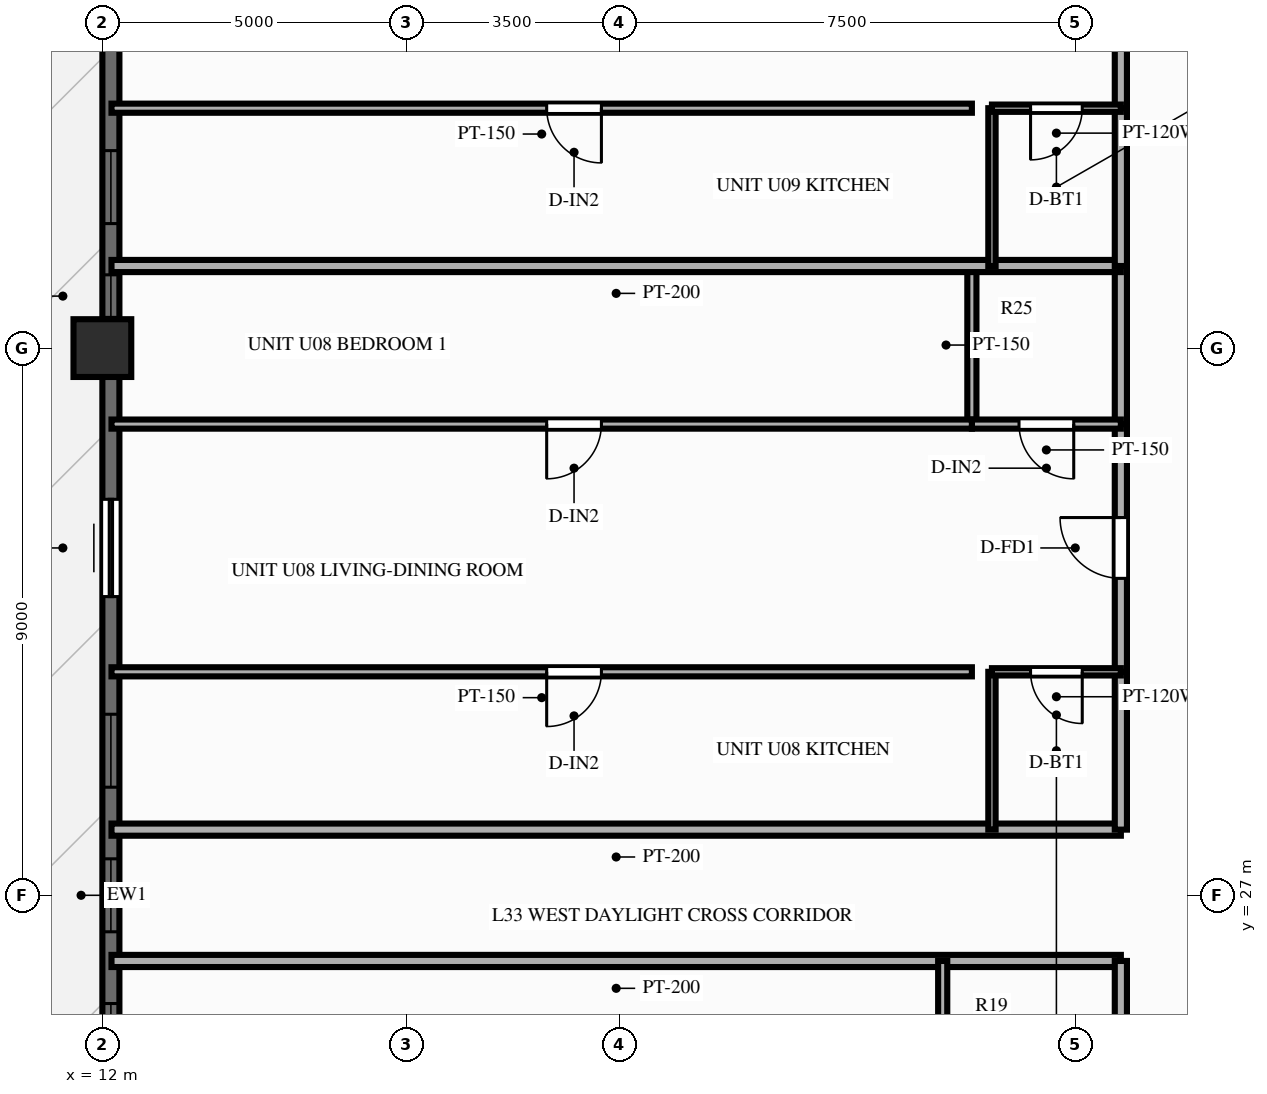
"""IFC4 building model, lengths in metres.
Left out: names, types, materials, properties, quantities, classifications, styles, units other than length and angle.
Written with IfcOpenShell. Run it as: python <this file> out.ifc"""

import sys

from ifc_helpers import new_model, si_unit, direction, frame, frame_2d, origin, origin_2d, place, context, subcontext, project, spatial, rectangle, extrude, source, transform, mapped, element, fill, save


model = new_model("IFC4")
c1 = context("Model", 3, precision=1e-05, world=origin(), true_north=direction((0.0, 1.0)))
c2 = subcontext(c1, "Body", "Model", "MODEL_VIEW")
j1 = project(units=[si_unit("LENGTHUNIT", "METRE"), si_unit("PLANEANGLEUNIT", "RADIAN")], contexts=[c1])
p1 = place(None, origin())
s1 = spatial("IfcSite", under=j1, at=p1, CompositionType="ELEMENT")
p2 = place(p1, origin())
s2 = spatial("IfcBuilding", under=s1, at=p2, CompositionType="ELEMENT")
p3 = place(p2, frame((0.0, 0.0, 104.85)))
s3 = spatial("IfcBuildingStorey", under=s2, at=p3, CompositionType="ELEMENT", Elevation=104.85)
m1 = source(origin(), c2, "Body", "SweptSolid", [
    extrude(rectangle(XDim=0.95, YDim=0.95, at=origin_2d()), origin(), (0.0, 0.0, 1.0), 3.0),
])
p4 = place(p3, frame((12.0, 36.0, 0.0), z_axis=(0.0, 0.0, 1.0), x_axis=(1.0, 0.0, 0.0)))
e1 = element("IfcColumn", 1, at=p4, inside=s3, PredefinedType="COLUMN", context=c2, shape_type="MappedRepresentation", body=[
    mapped(m1, transform((0.0, 0.0, 0.0), scale=1.0)),
])
p5 = place(p3, frame((12.14, 7.2, 0.0), z_axis=(0.0, 0.0, 1.0), x_axis=(0.0, 1.0, 0.0)))
e2 = element("IfcWall", 2, at=p5, inside=s3, PredefinedType="SOLIDWALL", context=c2, shape_type="SweptSolid", body=[
    extrude(rectangle(XDim=39.6, YDim=0.28, at=frame_2d((19.8, 0.0))), origin(), (0.0, 0.0, 1.0), 2.28),
])
p6 = place(p5, frame((0.945, 0.0, 0.25)))
e3 = element("IfcOpeningElement", 3, at=p6, cuts=e2, PredefinedType="OPENING", context=c2, shape_type="SweptSolid", body=[
    extrude(rectangle(XDim=1.2, YDim=1.5, at=frame_2d((0.6, 0.75))), frame((0.0, 0.152, 0.0), z_axis=(0.0, -1.0, 0.0), x_axis=(1.0, 0.0, 0.0)), (0.0, 0.0, 1.0), 0.304),
])
p7 = place(p5, frame((4.213, 0.0, 0.25)))
e4 = element("IfcOpeningElement", 4, at=p7, cuts=e2, PredefinedType="OPENING", context=c2, shape_type="SweptSolid", body=[
    extrude(rectangle(XDim=1.2, YDim=1.5, at=frame_2d((0.6, 0.75))), frame((0.0, 0.152, 0.0), z_axis=(0.0, -1.0, 0.0), x_axis=(1.0, 0.0, 0.0)), (0.0, 0.0, 1.0), 0.304),
])
p8 = place(p5, frame((7.55, 0.0, 0.25)))
e5 = element("IfcOpeningElement", 5, at=p8, cuts=e2, PredefinedType="OPENING", context=c2, shape_type="SweptSolid", body=[
    extrude(rectangle(XDim=1.2, YDim=1.5, at=frame_2d((0.6, 0.75))), frame((0.0, 0.152, 0.0), z_axis=(0.0, -1.0, 0.0), x_axis=(1.0, 0.0, 0.0)), (0.0, 0.0, 1.0), 0.304),
])
p9 = place(p5, frame((13.483, 0.0, 0.25)))
e6 = element("IfcOpeningElement", 6, at=p9, cuts=e2, PredefinedType="OPENING", context=c2, shape_type="SweptSolid", body=[
    extrude(rectangle(XDim=1.2, YDim=1.5, at=frame_2d((0.6, 0.75))), frame((0.0, 0.152, 0.0), z_axis=(0.0, -1.0, 0.0), x_axis=(1.0, 0.0, 0.0)), (0.0, 0.0, 1.0), 0.304),
])
p10 = place(p5, frame((16.82, 0.0, 0.25)))
e7 = element("IfcOpeningElement", 7, at=p10, cuts=e2, PredefinedType="OPENING", context=c2, shape_type="SweptSolid", body=[
    extrude(rectangle(XDim=1.2, YDim=1.5, at=frame_2d((0.6, 0.75))), frame((0.0, 0.152, 0.0), z_axis=(0.0, -1.0, 0.0), x_axis=(1.0, 0.0, 0.0)), (0.0, 0.0, 1.0), 0.304),
])
p11 = place(p5, frame((19.2, 0.0, 0.25)))
e8 = element("IfcOpeningElement", 8, at=p11, cuts=e2, PredefinedType="OPENING", context=c2, shape_type="SweptSolid", body=[
    extrude(rectangle(XDim=1.2, YDim=1.5, at=frame_2d((0.6, 0.75))), frame((0.0, 0.152, 0.0), z_axis=(0.0, -1.0, 0.0), x_axis=(1.0, 0.0, 0.0)), (0.0, 0.0, 1.0), 0.304),
])
p12 = place(p5, frame((21.578, 0.0, 0.25)))
e9 = element("IfcOpeningElement", 9, at=p12, cuts=e2, PredefinedType="OPENING", context=c2, shape_type="SweptSolid", body=[
    extrude(rectangle(XDim=1.2, YDim=1.5, at=frame_2d((0.6, 0.75))), frame((0.0, 0.152, 0.0), z_axis=(0.0, -1.0, 0.0), x_axis=(1.0, 0.0, 0.0)), (0.0, 0.0, 1.0), 0.304),
])
p13 = place(p5, frame((24.713, 0.0, 0.0)))
e10 = element("IfcOpeningElement", 10, at=p13, cuts=e2, PredefinedType="OPENING", context=c2, shape_type="SweptSolid", body=[
    extrude(rectangle(XDim=1.6, YDim=2.15, at=frame_2d((0.8, 1.075))), frame((0.0, 0.152, 0.0), z_axis=(0.0, -1.0, 0.0), x_axis=(1.0, 0.0, 0.0)), (0.0, 0.0, 1.0), 0.304),
])
p14 = place(p5, frame((29.305, 0.0, 0.25)))
e11 = element("IfcOpeningElement", 11, at=p14, cuts=e2, PredefinedType="OPENING", context=c2, shape_type="SweptSolid", body=[
    extrude(rectangle(XDim=0.7, YDim=1.5, at=frame_2d((0.35, 0.75))), frame((0.0, 0.152, 0.0), z_axis=(0.0, -1.0, 0.0), x_axis=(1.0, 0.0, 0.0)), (0.0, 0.0, 1.0), 0.304),
])
p15 = place(p5, frame((30.848, 0.0, 0.25)))
e12 = element("IfcOpeningElement", 12, at=p15, cuts=e2, PredefinedType="OPENING", context=c2, shape_type="SweptSolid", body=[
    extrude(rectangle(XDim=1.2, YDim=1.5, at=frame_2d((0.6, 0.75))), frame((0.0, 0.152, 0.0), z_axis=(0.0, -1.0, 0.0), x_axis=(1.0, 0.0, 0.0)), (0.0, 0.0, 1.0), 0.304),
])
p16 = place(p5, frame((34.183, 0.0, 0.25)))
e13 = element("IfcOpeningElement", 13, at=p16, cuts=e2, PredefinedType="OPENING", context=c2, shape_type="SweptSolid", body=[
    extrude(rectangle(XDim=1.2, YDim=1.5, at=frame_2d((0.6, 0.75))), frame((0.0, 0.152, 0.0), z_axis=(0.0, -1.0, 0.0), x_axis=(1.0, 0.0, 0.0)), (0.0, 0.0, 1.0), 0.304),
])
p17 = place(p5, frame((37.452, 0.0, 0.25)))
e14 = element("IfcOpeningElement", 14, at=p17, cuts=e2, PredefinedType="OPENING", context=c2, shape_type="SweptSolid", body=[
    extrude(rectangle(XDim=1.2, YDim=1.5, at=frame_2d((0.6, 0.75))), frame((0.0, 0.152, 0.0), z_axis=(0.0, -1.0, 0.0), x_axis=(1.0, 0.0, 0.0)), (0.0, 0.0, 1.0), 0.304),
])
p18 = place(p3, frame((28.75, 25.92, 0.0), z_axis=(0.0, 0.0, 1.0), x_axis=(-1.0, 0.0, 0.0)))
e15 = element("IfcWall", 15, at=p18, inside=s3, PredefinedType="PARTITIONING", context=c2, shape_type="SweptSolid", body=[
    extrude(rectangle(XDim=16.6, YDim=0.2, at=frame_2d((8.3, 0.0))), origin(), (0.0, 0.0, 1.0), 2.79),
])
p19 = place(p3, frame((28.75, 23.32, 0.0), z_axis=(0.0, 0.0, 1.0), x_axis=(0.0, 1.0, 0.0)))
e16 = element("IfcWall", 16, at=p19, inside=s3, PredefinedType="PARTITIONING", context=c2, shape_type="SweptSolid", body=[
    extrude(rectangle(XDim=2.6, YDim=0.2, at=frame_2d((1.3, 0.0))), origin(), (0.0, 0.0, 1.0), 2.79),
])
p20 = place(p3, frame((25.82, 23.32, 0.0), z_axis=(0.0, 0.0, 1.0), x_axis=(0.0, 1.0, 0.0)))
e17 = element("IfcWall", 17, at=p20, inside=s3, PredefinedType="PARTITIONING", context=c2, shape_type="SweptSolid", body=[
    extrude(rectangle(XDim=2.6, YDim=0.15, at=frame_2d((1.3, 0.0))), origin(), (0.0, 0.0, 1.0), 2.79),
])
p21 = place(p3, frame((28.75, 28.08, 0.0), z_axis=(0.0, 0.0, 1.0), x_axis=(-1.0, 0.0, 0.0)))
e18 = element("IfcWall", 18, at=p21, inside=s3, PredefinedType="PARTITIONING", context=c2, shape_type="SweptSolid", body=[
    extrude(rectangle(XDim=16.6, YDim=0.2, at=frame_2d((8.3, 0.0))), origin(), (0.0, 0.0, 1.0), 2.79),
])
p22 = place(p3, frame((28.75, 28.08, 0.0), z_axis=(0.0, 0.0, 1.0), x_axis=(0.0, 1.0, 0.0)))
e19 = element("IfcWall", 19, at=p22, inside=s3, PredefinedType="PARTITIONING", context=c2, shape_type="SweptSolid", body=[
    extrude(rectangle(XDim=2.595, YDim=0.2, at=frame_2d((1.298, 0.0))), origin(), (0.0, 0.0, 1.0), 2.79),
])
p23 = place(p3, frame((28.75, 30.676, 0.0), z_axis=(0.0, 0.0, 1.0), x_axis=(0.0, 1.0, 0.0)))
e20 = element("IfcWall", 20, at=p23, inside=s3, PredefinedType="PARTITIONING", context=c2, shape_type="SweptSolid", body=[
    extrude(rectangle(XDim=4.074, YDim=0.2, at=frame_2d((2.037, 0.0))), origin(), (0.0, 0.0, 1.0), 2.79),
])
p24 = place(p23, frame((1.537, 0.0, 0.0)))
e21 = element("IfcOpeningElement", 21, at=p24, cuts=e20, PredefinedType="OPENING", context=c2, shape_type="SweptSolid", body=[
    extrude(rectangle(XDim=1.0, YDim=2.15, at=frame_2d((0.5, 1.075))), frame((0.0, 0.112, 0.0), z_axis=(0.0, -1.0, 0.0), x_axis=(1.0, 0.0, 0.0)), (0.0, 0.0, 1.0), 0.224),
])
p25 = place(p3, frame((28.75, 34.75, 0.0), z_axis=(0.0, 0.0, 1.0), x_axis=(0.0, 1.0, 0.0)))
e22 = element("IfcWall", 22, at=p25, inside=s3, PredefinedType="PARTITIONING", context=c2, shape_type="SweptSolid", body=[
    extrude(rectangle(XDim=2.6, YDim=0.2, at=frame_2d((1.3, 0.0))), origin(), (0.0, 0.0, 1.0), 2.79),
])
p26 = place(p3, frame((26.63, 28.08, 0.0), z_axis=(0.0, 0.0, 1.0), x_axis=(0.0, 1.0, 0.0)))
e23 = element("IfcWall", 23, at=p26, inside=s3, PredefinedType="PARTITIONING", context=c2, shape_type="SweptSolid", body=[
    extrude(rectangle(XDim=2.595, YDim=0.12, at=frame_2d((1.298, 0.0))), origin(), (0.0, 0.0, 1.0), 2.79),
])
p27 = place(p3, frame((26.3, 34.75, 0.0), z_axis=(0.0, 0.0, 1.0), x_axis=(0.0, 1.0, 0.0)))
e24 = element("IfcWall", 24, at=p27, inside=s3, PredefinedType="PARTITIONING", context=c2, shape_type="SweptSolid", body=[
    extrude(rectangle(XDim=2.6, YDim=0.15, at=frame_2d((1.3, 0.0))), origin(), (0.0, 0.0, 1.0), 2.79),
])
p28 = place(p3, frame((28.75, 30.676, 0.0), z_axis=(0.0, 0.0, 1.0), x_axis=(-1.0, 0.0, 0.0)))
e25 = element("IfcWall", 25, at=p28, inside=s3, PredefinedType="PARTITIONING", context=c2, shape_type="SweptSolid", body=[
    extrude(rectangle(XDim=2.12, YDim=0.12, at=frame_2d((1.06, 0.0))), origin(), (0.0, 0.0, 1.0), 2.79),
])
p29 = place(p28, frame((0.635, 0.0, 0.0)))
e26 = element("IfcOpeningElement", 26, at=p29, cuts=e25, PredefinedType="OPENING", context=c2, shape_type="SweptSolid", body=[
    extrude(rectangle(XDim=0.85, YDim=2.05, at=frame_2d((0.425, 1.025))), frame((0.0, 0.072, 0.0), z_axis=(0.0, -1.0, 0.0), x_axis=(1.0, 0.0, 0.0)), (0.0, 0.0, 1.0), 0.144),
])
p30 = place(p3, frame((26.3, 30.676, 0.0), z_axis=(0.0, 0.0, 1.0), x_axis=(-1.0, 0.0, 0.0)))
e27 = element("IfcWall", 27, at=p30, inside=s3, PredefinedType="PARTITIONING", context=c2, shape_type="SweptSolid", body=[
    extrude(rectangle(XDim=14.15, YDim=0.15, at=frame_2d((7.075, 0.0))), origin(), (0.0, 0.0, 1.0), 2.79),
])
p31 = place(p30, frame((6.093, 0.0, 0.0)))
e28 = element("IfcOpeningElement", 28, at=p31, cuts=e27, PredefinedType="OPENING", context=c2, shape_type="SweptSolid", body=[
    extrude(rectangle(XDim=0.9, YDim=2.1, at=frame_2d((0.45, 1.05))), frame((0.0, 0.087, 0.0), z_axis=(0.0, -1.0, 0.0), x_axis=(1.0, 0.0, 0.0)), (0.0, 0.0, 1.0), 0.174),
])
p32 = place(p3, frame((28.75, 34.75, 0.0), z_axis=(0.0, 0.0, 1.0), x_axis=(-1.0, 0.0, 0.0)))
e29 = element("IfcWall", 29, at=p32, inside=s3, PredefinedType="PARTITIONING", context=c2, shape_type="SweptSolid", body=[
    extrude(rectangle(XDim=2.45, YDim=0.15, at=frame_2d((1.225, 0.0))), origin(), (0.0, 0.0, 1.0), 2.79),
])
p33 = place(p32, frame((0.775, 0.0, 0.0)))
e30 = element("IfcOpeningElement", 30, at=p33, cuts=e29, PredefinedType="OPENING", context=c2, shape_type="SweptSolid", body=[
    extrude(rectangle(XDim=0.9, YDim=2.1, at=frame_2d((0.45, 1.05))), frame((0.0, 0.087, 0.0), z_axis=(0.0, -1.0, 0.0), x_axis=(1.0, 0.0, 0.0)), (0.0, 0.0, 1.0), 0.174),
])
p34 = place(p3, frame((26.3, 34.75, 0.0), z_axis=(0.0, 0.0, 1.0), x_axis=(-1.0, 0.0, 0.0)))
e31 = element("IfcWall", 31, at=p34, inside=s3, PredefinedType="PARTITIONING", context=c2, shape_type="SweptSolid", body=[
    extrude(rectangle(XDim=14.15, YDim=0.15, at=frame_2d((7.075, 0.0))), origin(), (0.0, 0.0, 1.0), 2.79),
])
p35 = place(p34, frame((6.093, 0.0, 0.0)))
e32 = element("IfcOpeningElement", 32, at=p35, cuts=e31, PredefinedType="OPENING", context=c2, shape_type="SweptSolid", body=[
    extrude(rectangle(XDim=0.9, YDim=2.1, at=frame_2d((0.45, 1.05))), frame((0.0, 0.087, 0.0), z_axis=(0.0, -1.0, 0.0), x_axis=(1.0, 0.0, 0.0)), (0.0, 0.0, 1.0), 0.174),
])
p36 = place(p3, frame((28.75, 37.35, 0.0), z_axis=(0.0, 0.0, 1.0), x_axis=(-1.0, 0.0, 0.0)))
e33 = element("IfcWall", 33, at=p36, inside=s3, PredefinedType="PARTITIONING", context=c2, shape_type="SweptSolid", body=[
    extrude(rectangle(XDim=16.6, YDim=0.2, at=frame_2d((8.3, 0.0))), origin(), (0.0, 0.0, 1.0), 2.79),
])
p37 = place(p3, frame((28.75, 37.35, 0.0), z_axis=(0.0, 0.0, 1.0), x_axis=(0.0, 1.0, 0.0)))
e34 = element("IfcWall", 34, at=p37, inside=s3, PredefinedType="PARTITIONING", context=c2, shape_type="SweptSolid", body=[
    extrude(rectangle(XDim=2.595, YDim=0.2, at=frame_2d((1.298, 0.0))), origin(), (0.0, 0.0, 1.0), 2.79),
])
p38 = place(p3, frame((28.75, 39.946, 0.0), z_axis=(0.0, 0.0, 1.0), x_axis=(0.0, 1.0, 0.0)))
e35 = element("IfcWall", 35, at=p38, inside=s3, PredefinedType="PARTITIONING", context=c2, shape_type="SweptSolid", body=[
    extrude(rectangle(XDim=4.074, YDim=0.2, at=frame_2d((2.037, 0.0))), origin(), (0.0, 0.0, 1.0), 2.79),
])
p39 = place(p38, frame((1.537, 0.0, 0.0)))
e36 = element("IfcOpeningElement", 36, at=p39, cuts=e35, PredefinedType="OPENING", context=c2, shape_type="SweptSolid", body=[
    extrude(rectangle(XDim=1.0, YDim=2.15, at=frame_2d((0.5, 1.075))), frame((0.0, 0.112, 0.0), z_axis=(0.0, -1.0, 0.0), x_axis=(1.0, 0.0, 0.0)), (0.0, 0.0, 1.0), 0.224),
])
p40 = place(p3, frame((26.63, 37.35, 0.0), z_axis=(0.0, 0.0, 1.0), x_axis=(0.0, 1.0, 0.0)))
e37 = element("IfcWall", 37, at=p40, inside=s3, PredefinedType="PARTITIONING", context=c2, shape_type="SweptSolid", body=[
    extrude(rectangle(XDim=2.595, YDim=0.12, at=frame_2d((1.298, 0.0))), origin(), (0.0, 0.0, 1.0), 2.79),
])
p41 = place(p3, frame((28.75, 39.946, 0.0), z_axis=(0.0, 0.0, 1.0), x_axis=(-1.0, 0.0, 0.0)))
e38 = element("IfcWall", 38, at=p41, inside=s3, PredefinedType="PARTITIONING", context=c2, shape_type="SweptSolid", body=[
    extrude(rectangle(XDim=2.12, YDim=0.12, at=frame_2d((1.06, 0.0))), origin(), (0.0, 0.0, 1.0), 2.79),
])
p42 = place(p41, frame((0.635, 0.0, 0.0)))
e39 = element("IfcOpeningElement", 39, at=p42, cuts=e38, PredefinedType="OPENING", context=c2, shape_type="SweptSolid", body=[
    extrude(rectangle(XDim=0.85, YDim=2.05, at=frame_2d((0.425, 1.025))), frame((0.0, 0.072, 0.0), z_axis=(0.0, -1.0, 0.0), x_axis=(1.0, 0.0, 0.0)), (0.0, 0.0, 1.0), 0.144),
])
p43 = place(p3, frame((26.3, 39.946, 0.0), z_axis=(0.0, 0.0, 1.0), x_axis=(-1.0, 0.0, 0.0)))
e40 = element("IfcWall", 40, at=p43, inside=s3, PredefinedType="PARTITIONING", context=c2, shape_type="SweptSolid", body=[
    extrude(rectangle(XDim=14.15, YDim=0.15, at=frame_2d((7.075, 0.0))), origin(), (0.0, 0.0, 1.0), 2.79),
])
p44 = place(p43, frame((6.093, 0.0, 0.0)))
e41 = element("IfcOpeningElement", 41, at=p44, cuts=e40, PredefinedType="OPENING", context=c2, shape_type="SweptSolid", body=[
    extrude(rectangle(XDim=0.9, YDim=2.1, at=frame_2d((0.45, 1.05))), frame((0.0, 0.087, 0.0), z_axis=(0.0, -1.0, 0.0), x_axis=(1.0, 0.0, 0.0)), (0.0, 0.0, 1.0), 0.174),
])
m2 = source(origin(), c2, "Body", "SweptSolid", [
    extrude(rectangle(XDim=1.2, YDim=1.5, at=frame_2d((0.6, 0.75))), frame((0.0, 0.03, 0.0), z_axis=(0.0, -1.0, 0.0), x_axis=(1.0, 0.0, 0.0)), (0.0, 0.0, 1.0), 0.06),
])
p45 = place(p10, origin())
e42 = element("IfcWindow", 42, at=p45, inside=s3, PartitioningType="SINGLE_PANEL", PredefinedType="WINDOW", context=c2, shape_type="MappedRepresentation", body=[
    mapped(m2, transform((0.0, 0.0, 0.0), scale=1.0)),
])
fill(e7, e42)
p46 = place(p11, origin())
e43 = element("IfcWindow", 43, at=p46, inside=s3, PartitioningType="SINGLE_PANEL", PredefinedType="WINDOW", context=c2, shape_type="MappedRepresentation", body=[
    mapped(m2, transform((0.0, 0.0, 0.0), scale=1.0)),
])
fill(e8, e43)
p47 = place(p12, origin())
e44 = element("IfcWindow", 44, at=p47, inside=s3, PartitioningType="SINGLE_PANEL", PredefinedType="WINDOW", context=c2, shape_type="MappedRepresentation", body=[
    mapped(m2, transform((0.0, 0.0, 0.0), scale=1.0)),
])
fill(e9, e44)
m3 = source(origin(), c2, "Body", "SweptSolid", [
    extrude(rectangle(XDim=1.6, YDim=2.15, at=frame_2d((0.8, 1.075))), frame((0.0, 0.025, 0.0), z_axis=(0.0, -1.0, 0.0), x_axis=(1.0, 0.0, 0.0)), (0.0, 0.0, 1.0), 0.05),
])
p48 = place(p13, origin())
e45 = element("IfcDoor", 45, at=p48, inside=s3, OperationType="SLIDING_TO_LEFT", PredefinedType="DOOR", context=c2, shape_type="MappedRepresentation", body=[
    mapped(m3, transform((0.0, 0.0, 0.0), scale=1.0)),
])
fill(e10, e45)
m4 = source(origin(), c2, "Body", "SweptSolid", [
    extrude(rectangle(XDim=0.7, YDim=1.5, at=frame_2d((0.35, 0.75))), frame((0.0, 0.03, 0.0), z_axis=(0.0, -1.0, 0.0), x_axis=(1.0, 0.0, 0.0)), (0.0, 0.0, 1.0), 0.06),
])
p49 = place(p14, origin())
e46 = element("IfcWindow", 46, at=p49, inside=s3, PartitioningType="SINGLE_PANEL", PredefinedType="WINDOW", context=c2, shape_type="MappedRepresentation", body=[
    mapped(m4, transform((0.0, 0.0, 0.0), scale=1.0)),
])
fill(e11, e46)
p50 = place(p15, origin())
e47 = element("IfcWindow", 47, at=p50, inside=s3, PartitioningType="SINGLE_PANEL", PredefinedType="WINDOW", context=c2, shape_type="MappedRepresentation", body=[
    mapped(m2, transform((0.0, 0.0, 0.0), scale=1.0)),
])
fill(e12, e47)
m5 = source(origin(), c2, "Body", "SweptSolid", [
    extrude(rectangle(XDim=1.0, YDim=2.15, at=frame_2d((0.5, 1.075))), frame((0.0, 0.025, 0.0), z_axis=(0.0, -1.0, 0.0), x_axis=(1.0, 0.0, 0.0)), (0.0, 0.0, 1.0), 0.05),
])
p51 = place(p24, origin())
e48 = element("IfcDoor", 48, at=p51, inside=s3, OperationType="SINGLE_SWING_RIGHT", PredefinedType="DOOR", context=c2, shape_type="MappedRepresentation", body=[
    mapped(m5, transform((0.0, 0.0, 0.0), scale=1.0)),
])
fill(e21, e48)
m6 = source(origin(), c2, "Body", "SweptSolid", [
    extrude(rectangle(XDim=0.85, YDim=2.05, at=frame_2d((0.425, 1.025))), frame((0.0, 0.025, 0.0), z_axis=(0.0, -1.0, 0.0), x_axis=(1.0, 0.0, 0.0)), (0.0, 0.0, 1.0), 0.05),
])
p52 = place(p29, origin())
e49 = element("IfcDoor", 49, at=p52, inside=s3, OperationType="SINGLE_SWING_LEFT", PredefinedType="DOOR", context=c2, shape_type="MappedRepresentation", body=[
    mapped(m6, transform((0.0, 0.0, 0.0), scale=1.0)),
])
fill(e26, e49)
m7 = source(origin(), c2, "Body", "SweptSolid", [
    extrude(rectangle(XDim=0.9, YDim=2.1, at=frame_2d((0.45, 1.05))), frame((0.0, 0.025, 0.0), z_axis=(0.0, -1.0, 0.0), x_axis=(1.0, 0.0, 0.0)), (0.0, 0.0, 1.0), 0.05),
])
p53 = place(p31, origin())
e50 = element("IfcDoor", 50, at=p53, inside=s3, OperationType="SINGLE_SWING_RIGHT", PredefinedType="DOOR", context=c2, shape_type="MappedRepresentation", body=[
    mapped(m7, transform((0.0, 0.0, 0.0), scale=1.0)),
])
fill(e28, e50)
p54 = place(p33, origin())
e51 = element("IfcDoor", 51, at=p54, inside=s3, OperationType="SINGLE_SWING_LEFT", PredefinedType="DOOR", context=c2, shape_type="MappedRepresentation", body=[
    mapped(m7, transform((0.0, 0.0, 0.0), scale=1.0)),
])
fill(e30, e51)
p55 = place(p35, origin())
e52 = element("IfcDoor", 52, at=p55, inside=s3, OperationType="SINGLE_SWING_RIGHT", PredefinedType="DOOR", context=c2, shape_type="MappedRepresentation", body=[
    mapped(m7, transform((0.0, 0.0, 0.0), scale=1.0)),
])
fill(e32, e52)
p56 = place(p42, origin())
e53 = element("IfcDoor", 53, at=p56, inside=s3, OperationType="SINGLE_SWING_RIGHT", PredefinedType="DOOR", context=c2, shape_type="MappedRepresentation", body=[
    mapped(m6, transform((0.0, 0.0, 0.0), scale=1.0)),
])
fill(e39, e53)
p57 = place(p44, origin())
e54 = element("IfcDoor", 54, at=p57, inside=s3, OperationType="SINGLE_SWING_LEFT", PredefinedType="DOOR", context=c2, shape_type="MappedRepresentation", body=[
    mapped(m7, transform((0.0, 0.0, 0.0), scale=1.0)),
])
fill(e41, e54)
save(model, sys.argv[1])
